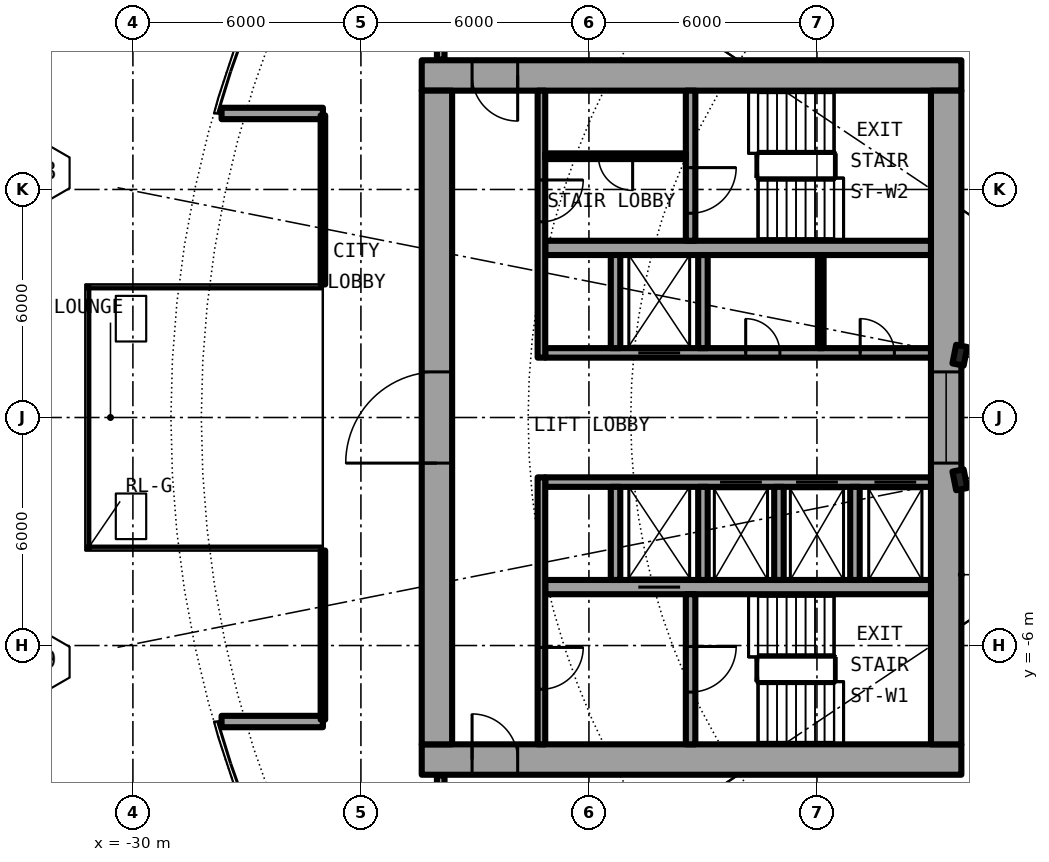
"""IFC4 building model, lengths in metres.
Left out: names, types, materials, properties, quantities, classifications, styles, units other than length and angle.
Written with IfcOpenShell. Run it as: python <this file> out.ifc"""

import sys

from ifc_helpers import new_model, si_unit, direction, frame, frame_2d, origin, origin_2d, place, context, subcontext, project, spatial, rectangle, i_section, extrude, element, fill, save


model = new_model("IFC4")
c1 = context("Model", 3, precision=1e-05, world=origin(), true_north=direction((0.0, 1.0)))
c2 = subcontext(c1, "Body", "Model", "MODEL_VIEW")
j1 = project(units=[si_unit("LENGTHUNIT", "METRE"), si_unit("PLANEANGLEUNIT", "RADIAN")], contexts=[c1])
p1 = place(None, origin())
s1 = spatial("IfcSite", under=j1, at=p1, CompositionType="ELEMENT")
p2 = place(p1, origin())
s2 = spatial("IfcBuilding", under=s1, at=p2, CompositionType="ELEMENT")
p3 = place(p2, frame((0.0, 0.0, 57.5)))
s3 = spatial("IfcBuildingStorey", under=s2, at=p3, CompositionType="ELEMENT", Elevation=57.5)
for number, where, z_axis, x_axis in (
    (1, (-8.239, 1.639, 0.0), (0.0, 0.0, 1.0), (-0.981, 0.195, 0.0)),
    (2, (-8.239, -1.639, 0.0), (0.0, 0.0, 1.0), (-0.981, -0.195, 0.0)),
):
    element("IfcColumn", number, at=place(p3, frame(where, z_axis=z_axis, x_axis=x_axis)), inside=s3, PredefinedType="COLUMN", context=c2, shape_type="SweptSolid", body=[
        extrude(i_section(OverallWidth=0.3, OverallDepth=0.5, WebThickness=0.014, FlangeThickness=0.028, FilletRadius=0.027, at=origin_2d()), origin(), (0.0, 0.0, 1.0), 6.1),
    ])
for number, where, z_axis, x_axis in (
    (3, (-25.0, 8.0, 0.0), (0.0, 0.0, 1.0), (-1.0, 0.0, 0.0)),
    (4, (-25.0, -8.0, 0.0), (0.0, 0.0, 1.0), (-1.0, 0.0, 0.0)),
):
    element("IfcWall", number, at=place(p3, frame(where, z_axis=z_axis, x_axis=x_axis)), inside=s3, PredefinedType="SOLIDWALL", context=c2, shape_type="SweptSolid", body=[
        extrude(rectangle(XDim=2.667, YDim=0.3, at=frame_2d((1.333, 0.0))), origin(), (0.0, 0.0, 1.0), 5.75),
    ])
p4 = place(p3, frame((-22.4, -9.0, 0.0), z_axis=(0.0, 0.0, 1.0), x_axis=(1.0, 0.0, 0.0)))
e5 = element("IfcWall", 5, at=p4, inside=s3, PredefinedType="SHEAR", context=c2, shape_type="SweptSolid", body=[
    extrude(rectangle(XDim=14.2, YDim=0.8, at=frame_2d((7.1, 0.0))), origin(), (0.0, 0.0, 1.0), 6.1),
])
p5 = place(p4, frame((1.325, 0.0, 0.0)))
e6 = element("IfcOpeningElement", 6, at=p5, cuts=e5, PredefinedType="OPENING", context=c2, shape_type="SweptSolid", body=[
    extrude(rectangle(XDim=1.2, YDim=2.3, at=frame_2d((0.6, 1.15))), frame((0.0, 0.41, 0.0), z_axis=(0.0, -1.0, 0.0), x_axis=(1.0, 0.0, 0.0)), (0.0, 0.0, 1.0), 0.82),
])
p6 = place(p3, frame((-8.2, 9.0, 0.0), z_axis=(0.0, 0.0, 1.0), x_axis=(-1.0, 0.0, 0.0)))
e7 = element("IfcWall", 7, at=p6, inside=s3, PredefinedType="SHEAR", context=c2, shape_type="SweptSolid", body=[
    extrude(rectangle(XDim=14.2, YDim=0.8, at=frame_2d((7.1, 0.0))), origin(), (0.0, 0.0, 1.0), 6.1),
])
p7 = place(p6, frame((11.675, 0.0, 0.0)))
e8 = element("IfcOpeningElement", 8, at=p7, cuts=e7, PredefinedType="OPENING", context=c2, shape_type="SweptSolid", body=[
    extrude(rectangle(XDim=1.2, YDim=2.3, at=frame_2d((0.6, 1.15))), frame((0.0, 0.41, 0.0), z_axis=(0.0, -1.0, 0.0), x_axis=(1.0, 0.0, 0.0)), (0.0, 0.0, 1.0), 0.82),
])
p8 = place(p3, frame((-22.0, -8.6, 0.0), z_axis=(0.0, 0.0, 1.0), x_axis=(0.0, 1.0, 0.0)))
e9 = element("IfcWall", 9, at=p8, inside=s3, PredefinedType="SHEAR", context=c2, shape_type="SweptSolid", body=[
    extrude(rectangle(XDim=17.2, YDim=0.8, at=frame_2d((8.6, 0.0))), origin(), (0.0, 0.0, 1.0), 6.1),
])
p9 = place(p8, frame((7.4, 0.0, 0.0)))
e10 = element("IfcOpeningElement", 10, at=p9, cuts=e9, PredefinedType="OPENING", context=c2, shape_type="SweptSolid", body=[
    extrude(rectangle(XDim=2.4, YDim=2.3, at=frame_2d((1.2, 1.15))), frame((0.0, 0.41, 0.0), z_axis=(0.0, -1.0, 0.0), x_axis=(1.0, 0.0, 0.0)), (0.0, 0.0, 1.0), 0.82),
])
p10 = place(p3, frame((-8.6, 8.6, 0.0), z_axis=(0.0, 0.0, 1.0), x_axis=(0.0, -1.0, 0.0)))
e11 = element("IfcWall", 11, at=p10, inside=s3, PredefinedType="SHEAR", context=c2, shape_type="SweptSolid", body=[
    extrude(rectangle(XDim=17.2, YDim=0.8, at=frame_2d((8.6, 0.0))), origin(), (0.0, 0.0, 1.0), 6.1),
])
p11 = place(p10, frame((7.4, 0.0, 0.1)))
e12 = element("IfcOpeningElement", 12, at=p11, cuts=e11, PredefinedType="OPENING", context=c2, shape_type="SweptSolid", body=[
    extrude(rectangle(XDim=2.4, YDim=2.2, at=frame_2d((1.2, 1.1))), frame((0.0, 0.41, 0.0), z_axis=(0.0, -1.0, 0.0), x_axis=(1.0, 0.0, 0.0)), (0.0, 0.0, 1.0), 0.82),
])
p12 = place(p3, frame((-9.0, -1.7, 0.0), z_axis=(0.0, 0.0, 1.0), x_axis=(-1.0, 0.0, 0.0)))
e13 = element("IfcWall", 13, at=p12, inside=s3, PredefinedType="SHEAR", context=c2, shape_type="SweptSolid", body=[
    extrude(rectangle(XDim=10.15, YDim=0.25, at=frame_2d((5.075, 0.0))), origin(), (0.0, 0.0, 1.0), 6.1),
])
p13 = place(p12, frame((0.387, 0.0, 0.0)))
e14 = element("IfcOpeningElement", 14, at=p13, cuts=e13, PredefinedType="OPENING", context=c2, shape_type="SweptSolid", body=[
    extrude(rectangle(XDim=1.1, YDim=2.3, at=frame_2d((0.55, 1.15))), frame((0.0, 0.135, 0.0), z_axis=(0.0, -1.0, 0.0), x_axis=(1.0, 0.0, 0.0)), (0.0, 0.0, 1.0), 0.27),
])
p14 = place(p12, frame((2.45, 0.0, 0.0)))
e15 = element("IfcOpeningElement", 15, at=p14, cuts=e13, PredefinedType="OPENING", context=c2, shape_type="SweptSolid", body=[
    extrude(rectangle(XDim=1.1, YDim=2.3, at=frame_2d((0.55, 1.15))), frame((0.0, 0.135, 0.0), z_axis=(0.0, -1.0, 0.0), x_axis=(1.0, 0.0, 0.0)), (0.0, 0.0, 1.0), 0.27),
])
p15 = place(p12, frame((4.45, 0.0, 0.0)))
e16 = element("IfcOpeningElement", 16, at=p15, cuts=e13, PredefinedType="OPENING", context=c2, shape_type="SweptSolid", body=[
    extrude(rectangle(XDim=1.1, YDim=2.3, at=frame_2d((0.55, 1.15))), frame((0.0, 0.135, 0.0), z_axis=(0.0, -1.0, 0.0), x_axis=(1.0, 0.0, 0.0)), (0.0, 0.0, 1.0), 0.27),
])
p16 = place(p3, frame((-9.0, -4.462, 0.0), z_axis=(0.0, 0.0, 1.0), x_axis=(-1.0, 0.0, 0.0)))
e17 = element("IfcWall", 17, at=p16, inside=s3, PredefinedType="SHEAR", context=c2, shape_type="SweptSolid", body=[
    extrude(rectangle(XDim=10.15, YDim=0.375, at=frame_2d((5.075, 0.0))), origin(), (0.0, 0.0, 1.0), 6.1),
])
p17 = place(p16, frame((6.6, 0.0, 0.0)))
e18 = element("IfcOpeningElement", 18, at=p17, cuts=e17, PredefinedType="OPENING", context=c2, shape_type="SweptSolid", body=[
    extrude(rectangle(XDim=1.1, YDim=2.3, at=frame_2d((0.55, 1.15))), frame((0.0, 0.198, 0.0), z_axis=(0.0, -1.0, 0.0), x_axis=(1.0, 0.0, 0.0)), (0.0, 0.0, 1.0), 0.395),
])
p18 = place(p3, frame((-15.325, -4.65, 0.0), z_axis=(0.0, 0.0, 1.0), x_axis=(0.0, -1.0, 0.0)))
e19 = element("IfcWall", 19, at=p18, inside=s3, PredefinedType="SHEAR", context=c2, shape_type="SweptSolid", body=[
    extrude(rectangle(XDim=3.95, YDim=0.25, at=frame_2d((1.975, 0.0))), origin(), (0.0, 0.0, 1.0), 6.1),
])
p19 = place(p18, frame((1.375, 0.0, 0.0)))
e20 = element("IfcOpeningElement", 20, at=p19, cuts=e19, PredefinedType="OPENING", context=c2, shape_type="SweptSolid", body=[
    extrude(rectangle(XDim=1.2, YDim=2.3, at=frame_2d((0.6, 1.15))), frame((0.0, 0.135, 0.0), z_axis=(0.0, -1.0, 0.0), x_axis=(1.0, 0.0, 0.0)), (0.0, 0.0, 1.0), 0.27),
])
for number, where, z_axis, x_axis in (
    (21, (-15.0, -1.825, 0.0), (0.0, 0.0, 1.0), (0.0, -1.0, 0.0)),
    (22, (-17.3, -1.825, 0.0), (0.0, 0.0, 1.0), (0.0, -1.0, 0.0)),
):
    element("IfcWall", number, at=place(p3, frame(where, z_axis=z_axis, x_axis=x_axis)), inside=s3, PredefinedType="SOLIDWALL", context=c2, shape_type="SweptSolid", body=[
        extrude(rectangle(XDim=2.45, YDim=0.25, at=frame_2d((1.225, 0.0))), origin(), (0.0, 0.0, 1.0), 5.75),
    ])
p20 = place(p3, frame((-19.25, -1.575, 0.0), z_axis=(0.0, 0.0, 1.0), x_axis=(0.0, -1.0, 0.0)))
e23 = element("IfcWall", 23, at=p20, inside=s3, PredefinedType="SOLIDWALL", context=c2, shape_type="SweptSolid", body=[
    extrude(rectangle(XDim=7.025, YDim=0.2, at=frame_2d((3.513, 0.0))), origin(), (0.0, 0.0, 1.0), 5.75),
])
p21 = place(p20, frame((4.475, 0.0, 0.0)))
e24 = element("IfcOpeningElement", 24, at=p21, cuts=e23, PredefinedType="OPENING", context=c2, shape_type="SweptSolid", body=[
    extrude(rectangle(XDim=1.1, YDim=2.3, at=frame_2d((0.55, 1.15))), frame((0.0, 0.11, 0.0), z_axis=(0.0, -1.0, 0.0), x_axis=(1.0, 0.0, 0.0)), (0.0, 0.0, 1.0), 0.22),
])
p22 = place(p3, frame((-19.15, 1.7, 0.0), z_axis=(0.0, 0.0, 1.0), x_axis=(1.0, 0.0, 0.0)))
e25 = element("IfcWall", 25, at=p22, inside=s3, PredefinedType="SHEAR", context=c2, shape_type="SweptSolid", body=[
    extrude(rectangle(XDim=10.15, YDim=0.25, at=frame_2d((5.075, 0.0))), origin(), (0.0, 0.0, 1.0), 6.1),
])
p23 = place(p22, frame((2.45, 0.0, 0.0)))
e26 = element("IfcOpeningElement", 26, at=p23, cuts=e25, PredefinedType="OPENING", context=c2, shape_type="SweptSolid", body=[
    extrude(rectangle(XDim=1.1, YDim=2.3, at=frame_2d((0.55, 1.15))), frame((0.0, 0.135, 0.0), z_axis=(0.0, -1.0, 0.0), x_axis=(1.0, 0.0, 0.0)), (0.0, 0.0, 1.0), 0.27),
])
p24 = place(p22, frame((8.288, 0.0, 0.0)))
e27 = element("IfcOpeningElement", 27, at=p24, cuts=e25, PredefinedType="OPENING", context=c2, shape_type="SweptSolid", body=[
    extrude(rectangle(XDim=0.9, YDim=2.3, at=frame_2d((0.45, 1.15))), frame((0.0, 0.135, 0.0), z_axis=(0.0, -1.0, 0.0), x_axis=(1.0, 0.0, 0.0)), (0.0, 0.0, 1.0), 0.27),
])
p25 = place(p22, frame((5.275, 0.0, 0.0)))
e28 = element("IfcOpeningElement", 28, at=p25, cuts=e25, PredefinedType="OPENING", context=c2, shape_type="SweptSolid", body=[
    extrude(rectangle(XDim=0.9, YDim=2.3, at=frame_2d((0.45, 1.15))), frame((0.0, 0.135, 0.0), z_axis=(0.0, -1.0, 0.0), x_axis=(1.0, 0.0, 0.0)), (0.0, 0.0, 1.0), 0.27),
])
p26 = place(p3, frame((-9.0, 4.462, 0.0), z_axis=(0.0, 0.0, 1.0), x_axis=(-1.0, 0.0, 0.0)))
e29 = element("IfcWall", 29, at=p26, inside=s3, PredefinedType="SHEAR", context=c2, shape_type="SweptSolid", body=[
    extrude(rectangle(XDim=10.15, YDim=0.375, at=frame_2d((5.075, 0.0))), origin(), (0.0, 0.0, 1.0), 6.1),
])
p27 = place(p3, frame((-15.325, 8.6, 0.0), z_axis=(0.0, 0.0, 1.0), x_axis=(0.0, -1.0, 0.0)))
e30 = element("IfcWall", 30, at=p27, inside=s3, PredefinedType="SHEAR", context=c2, shape_type="SweptSolid", body=[
    extrude(rectangle(XDim=3.95, YDim=0.25, at=frame_2d((1.975, 0.0))), origin(), (0.0, 0.0, 1.0), 6.1),
])
p28 = place(p27, frame((2.025, 0.0, 0.0)))
e31 = element("IfcOpeningElement", 31, at=p28, cuts=e30, PredefinedType="OPENING", context=c2, shape_type="SweptSolid", body=[
    extrude(rectangle(XDim=1.2, YDim=2.3, at=frame_2d((0.6, 1.15))), frame((0.0, 0.135, 0.0), z_axis=(0.0, -1.0, 0.0), x_axis=(1.0, 0.0, 0.0)), (0.0, 0.0, 1.0), 0.27),
])
for number, where, z_axis, x_axis in (
    (32, (-15.0, 1.825, 0.0), (0.0, 0.0, 1.0), (0.0, 1.0, 0.0)),
    (33, (-17.3, 1.825, 0.0), (0.0, 0.0, 1.0), (0.0, 1.0, 0.0)),
):
    element("IfcWall", number, at=place(p3, frame(where, z_axis=z_axis, x_axis=x_axis)), inside=s3, PredefinedType="SOLIDWALL", context=c2, shape_type="SweptSolid", body=[
        extrude(rectangle(XDim=2.45, YDim=0.25, at=frame_2d((1.225, 0.0))), origin(), (0.0, 0.0, 1.0), 5.75),
    ])
p29 = place(p3, frame((-19.25, 8.6, 0.0), z_axis=(0.0, 0.0, 1.0), x_axis=(0.0, -1.0, 0.0)))
e34 = element("IfcWall", 34, at=p29, inside=s3, PredefinedType="SOLIDWALL", context=c2, shape_type="SweptSolid", body=[
    extrude(rectangle(XDim=7.025, YDim=0.2, at=frame_2d((3.513, 0.0))), origin(), (0.0, 0.0, 1.0), 5.75),
])
p30 = place(p29, frame((2.35, 0.0, 0.0)))
e35 = element("IfcOpeningElement", 35, at=p30, cuts=e34, PredefinedType="OPENING", context=c2, shape_type="SweptSolid", body=[
    extrude(rectangle(XDim=1.1, YDim=2.3, at=frame_2d((0.55, 1.15))), frame((0.0, 0.11, 0.0), z_axis=(0.0, -1.0, 0.0), x_axis=(1.0, 0.0, 0.0)), (0.0, 0.0, 1.0), 0.22),
])
for number, where, z_axis, x_axis in (
    (36, (-11.0, -1.825, 0.0), (0.0, 0.0, 1.0), (0.0, -1.0, 0.0)),
    (37, (-13.0, -1.825, 0.0), (0.0, 0.0, 1.0), (0.0, -1.0, 0.0)),
):
    element("IfcWall", number, at=place(p3, frame(where, z_axis=z_axis, x_axis=x_axis)), inside=s3, PredefinedType="SOLIDWALL", context=c2, shape_type="SweptSolid", body=[
        extrude(rectangle(XDim=2.45, YDim=0.25, at=frame_2d((1.225, 0.0))), origin(), (0.0, 0.0, 1.0), 5.75),
    ])
p31 = place(p3, frame((-11.9, 1.825, 0.0), z_axis=(0.0, 0.0, 1.0), x_axis=(0.0, 1.0, 0.0)))
e38 = element("IfcWall", 38, at=p31, inside=s3, PredefinedType="PARTITIONING", context=c2, shape_type="SweptSolid", body=[
    extrude(rectangle(XDim=2.45, YDim=0.15, at=frame_2d((1.225, 0.0))), origin(), (0.0, 0.0, 1.0), 5.75),
])
p32 = place(p3, frame((-15.45, 6.875, 0.0), z_axis=(0.0, 0.0, 1.0), x_axis=(-1.0, 0.0, 0.0)))
e39 = element("IfcWall", 39, at=p32, inside=s3, PredefinedType="PARTITIONING", context=c2, shape_type="SweptSolid", body=[
    extrude(rectangle(XDim=3.7, YDim=0.15, at=frame_2d((1.85, 0.0))), origin(), (0.0, 0.0, 1.0), 5.75),
])
p33 = place(p32, frame((1.4, 0.0, 0.0)))
e40 = element("IfcOpeningElement", 40, at=p33, cuts=e39, PredefinedType="OPENING", context=c2, shape_type="SweptSolid", body=[
    extrude(rectangle(XDim=0.9, YDim=2.3, at=frame_2d((0.45, 1.15))), frame((0.0, 0.085, 0.0), z_axis=(0.0, -1.0, 0.0), x_axis=(1.0, 0.0, 0.0)), (0.0, 0.0, 1.0), 0.17),
])
p34 = place(p3, frame((-25.0, 3.5, 0.0), z_axis=(0.0, 0.0, 1.0), x_axis=(0.0, 1.0, 0.0)))
e41 = element("IfcWall", 41, at=p34, inside=s3, PredefinedType="PARTITIONING", context=c2, shape_type="SweptSolid", body=[
    extrude(rectangle(XDim=4.45, YDim=0.12, at=frame_2d((2.225, 0.0))), origin(), (0.0, 0.0, 1.0), 5.75),
])
p35 = place(p34, frame((0.4, 0.0, 0.1)))
e42 = element("IfcOpeningElement", 42, at=p35, cuts=e41, PredefinedType="OPENING", context=c2, shape_type="SweptSolid", body=[
    extrude(rectangle(XDim=3.6, YDim=5.4, at=frame_2d((1.8, 2.7))), frame((0.0, 0.07, 0.0), z_axis=(0.0, -1.0, 0.0), x_axis=(1.0, 0.0, 0.0)), (0.0, 0.0, 1.0), 0.14),
])
p36 = place(p3, frame((-25.0, -3.5, 0.0), z_axis=(0.0, 0.0, 1.0), x_axis=(0.0, -1.0, 0.0)))
e43 = element("IfcWall", 43, at=p36, inside=s3, PredefinedType="PARTITIONING", context=c2, shape_type="SweptSolid", body=[
    extrude(rectangle(XDim=4.45, YDim=0.12, at=frame_2d((2.225, 0.0))), origin(), (0.0, 0.0, 1.0), 5.75),
])
p37 = place(p36, frame((0.4, 0.0, 0.1)))
e44 = element("IfcOpeningElement", 44, at=p37, cuts=e43, PredefinedType="OPENING", context=c2, shape_type="SweptSolid", body=[
    extrude(rectangle(XDim=3.6, YDim=5.4, at=frame_2d((1.8, 2.7))), frame((0.0, 0.07, 0.0), z_axis=(0.0, -1.0, 0.0), x_axis=(1.0, 0.0, 0.0)), (0.0, 0.0, 1.0), 0.14),
])
p38 = place(p3, frame((-10.393, 25.091, 0.0), z_axis=(0.0, 0.0, 1.0), x_axis=(0.382668905709, -0.923885549516, 0.0)))
e45 = element("IfcWall", 45, at=p38, inside=s3, PredefinedType="PARTITIONING", context=c2, shape_type="SweptSolid", body=[
    extrude(rectangle(XDim=17.339, YDim=0.15, at=frame_2d((8.669, 0.0))), origin(), (0.0, 0.0, 1.0), 5.75),
])
for number, where, z_axis, x_axis in (
    (46, (-21.9, -12.82, 0.0), (0.0, 0.0, 1.0), (0.0, 1.0, 0.0)),
    (47, (-21.9, 9.42, 0.0), (0.0, 0.0, 1.0), (0.0, 1.0, 0.0)),
):
    element("IfcWall", number, at=place(p3, frame(where, z_axis=z_axis, x_axis=x_axis)), inside=s3, PredefinedType="PARTITIONING", context=c2, shape_type="SweptSolid", body=[
        extrude(rectangle(XDim=3.4, YDim=0.2, at=frame_2d((1.7, 0.0))), origin(), (0.0, 0.0, 1.0), 5.75),
    ])
p39 = place(p13, origin())
e48 = element("IfcDoor", 48, at=p39, inside=s3, OperationType="DOUBLE_DOOR_SLIDING", PredefinedType="DOOR", context=c2, shape_type="SweptSolid", body=[
    extrude(rectangle(XDim=1.1, YDim=2.3, at=frame_2d((0.55, 1.15))), frame((0.0, 0.025, 0.0), z_axis=(0.0, -1.0, 0.0), x_axis=(1.0, 0.0, 0.0)), (0.0, 0.0, 1.0), 0.05),
])
fill(e14, e48)
p40 = place(p14, origin())
e49 = element("IfcDoor", 49, at=p40, inside=s3, OperationType="DOUBLE_DOOR_SLIDING", PredefinedType="DOOR", context=c2, shape_type="SweptSolid", body=[
    extrude(rectangle(XDim=1.1, YDim=2.3, at=frame_2d((0.55, 1.15))), frame((0.0, 0.025, 0.0), z_axis=(0.0, -1.0, 0.0), x_axis=(1.0, 0.0, 0.0)), (0.0, 0.0, 1.0), 0.05),
])
fill(e15, e49)
p41 = place(p15, origin())
e50 = element("IfcDoor", 50, at=p41, inside=s3, OperationType="DOUBLE_DOOR_SLIDING", PredefinedType="DOOR", context=c2, shape_type="SweptSolid", body=[
    extrude(rectangle(XDim=1.1, YDim=2.3, at=frame_2d((0.55, 1.15))), frame((0.0, 0.025, 0.0), z_axis=(0.0, -1.0, 0.0), x_axis=(1.0, 0.0, 0.0)), (0.0, 0.0, 1.0), 0.05),
])
fill(e16, e50)
p42 = place(p17, origin())
e51 = element("IfcDoor", 51, at=p42, inside=s3, OperationType="DOUBLE_DOOR_SLIDING", PredefinedType="DOOR", context=c2, shape_type="SweptSolid", body=[
    extrude(rectangle(XDim=1.1, YDim=2.3, at=frame_2d((0.55, 1.15))), frame((0.0, 0.025, 0.0), z_axis=(0.0, -1.0, 0.0), x_axis=(1.0, 0.0, 0.0)), (0.0, 0.0, 1.0), 0.05),
])
fill(e18, e51)
p43 = place(p23, origin())
e52 = element("IfcDoor", 52, at=p43, inside=s3, OperationType="DOUBLE_DOOR_SLIDING", PredefinedType="DOOR", context=c2, shape_type="SweptSolid", body=[
    extrude(rectangle(XDim=1.1, YDim=2.3, at=frame_2d((0.55, 1.15))), frame((0.0, 0.025, 0.0), z_axis=(0.0, -1.0, 0.0), x_axis=(1.0, 0.0, 0.0)), (0.0, 0.0, 1.0), 0.05),
])
fill(e26, e52)
p44 = place(p24, origin())
e53 = element("IfcDoor", 53, at=p44, inside=s3, OperationType="SINGLE_SWING_LEFT", PredefinedType="DOOR", context=c2, shape_type="SweptSolid", body=[
    extrude(rectangle(XDim=0.9, YDim=2.3, at=frame_2d((0.45, 1.15))), frame((0.0, 0.025, 0.0), z_axis=(0.0, -1.0, 0.0), x_axis=(1.0, 0.0, 0.0)), (0.0, 0.0, 1.0), 0.05),
])
fill(e27, e53)
p45 = place(p25, origin())
e54 = element("IfcDoor", 54, at=p45, inside=s3, OperationType="SINGLE_SWING_LEFT", PredefinedType="DOOR", context=c2, shape_type="SweptSolid", body=[
    extrude(rectangle(XDim=0.9, YDim=2.3, at=frame_2d((0.45, 1.15))), frame((0.0, 0.025, 0.0), z_axis=(0.0, -1.0, 0.0), x_axis=(1.0, 0.0, 0.0)), (0.0, 0.0, 1.0), 0.05),
])
fill(e28, e54)
p46 = place(p33, origin())
e55 = element("IfcDoor", 55, at=p46, inside=s3, OperationType="SINGLE_SWING_LEFT", PredefinedType="DOOR", context=c2, shape_type="SweptSolid", body=[
    extrude(rectangle(XDim=0.9, YDim=2.3, at=frame_2d((0.45, 1.15))), frame((0.0, 0.025, 0.0), z_axis=(0.0, -1.0, 0.0), x_axis=(1.0, 0.0, 0.0)), (0.0, 0.0, 1.0), 0.05),
])
fill(e40, e55)
p47 = place(p19, origin())
e56 = element("IfcDoor", 56, at=p47, inside=s3, OperationType="SINGLE_SWING_LEFT", PredefinedType="DOOR", context=c2, shape_type="SweptSolid", body=[
    extrude(rectangle(XDim=1.2, YDim=2.3, at=frame_2d((0.6, 1.15))), frame((0.0, 0.025, 0.0), z_axis=(0.0, -1.0, 0.0), x_axis=(1.0, 0.0, 0.0)), (0.0, 0.0, 1.0), 0.05),
])
fill(e20, e56)
p48 = place(p28, origin())
e57 = element("IfcDoor", 57, at=p48, inside=s3, OperationType="SINGLE_SWING_LEFT", PredefinedType="DOOR", context=c2, shape_type="SweptSolid", body=[
    extrude(rectangle(XDim=1.2, YDim=2.3, at=frame_2d((0.6, 1.15))), frame((0.0, 0.025, 0.0), z_axis=(0.0, -1.0, 0.0), x_axis=(1.0, 0.0, 0.0)), (0.0, 0.0, 1.0), 0.05),
])
fill(e31, e57)
p49 = place(p21, origin())
e58 = element("IfcDoor", 58, at=p49, inside=s3, OperationType="SINGLE_SWING_LEFT", PredefinedType="DOOR", context=c2, shape_type="SweptSolid", body=[
    extrude(rectangle(XDim=1.1, YDim=2.3, at=frame_2d((0.55, 1.15))), frame((0.0, 0.025, 0.0), z_axis=(0.0, -1.0, 0.0), x_axis=(1.0, 0.0, 0.0)), (0.0, 0.0, 1.0), 0.05),
])
fill(e24, e58)
p50 = place(p30, origin())
e59 = element("IfcDoor", 59, at=p50, inside=s3, OperationType="SINGLE_SWING_RIGHT", PredefinedType="DOOR", context=c2, shape_type="SweptSolid", body=[
    extrude(rectangle(XDim=1.1, YDim=2.3, at=frame_2d((0.55, 1.15))), frame((0.0, 0.025, 0.0), z_axis=(0.0, -1.0, 0.0), x_axis=(1.0, 0.0, 0.0)), (0.0, 0.0, 1.0), 0.05),
])
fill(e35, e59)
p51 = place(p5, origin())
e60 = element("IfcDoor", 60, at=p51, inside=s3, OperationType="SINGLE_SWING_RIGHT", PredefinedType="DOOR", context=c2, shape_type="SweptSolid", body=[
    extrude(rectangle(XDim=1.2, YDim=2.3, at=frame_2d((0.6, 1.15))), frame((0.0, 0.025, 0.0), z_axis=(0.0, -1.0, 0.0), x_axis=(1.0, 0.0, 0.0)), (0.0, 0.0, 1.0), 0.05),
])
fill(e6, e60)
p52 = place(p7, origin())
e61 = element("IfcDoor", 61, at=p52, inside=s3, OperationType="SINGLE_SWING_LEFT", PredefinedType="DOOR", context=c2, shape_type="SweptSolid", body=[
    extrude(rectangle(XDim=1.2, YDim=2.3, at=frame_2d((0.6, 1.15))), frame((0.0, 0.025, 0.0), z_axis=(0.0, -1.0, 0.0), x_axis=(1.0, 0.0, 0.0)), (0.0, 0.0, 1.0), 0.05),
])
fill(e8, e61)
p53 = place(p9, origin())
e62 = element("IfcDoor", 62, at=p53, inside=s3, OperationType="SINGLE_SWING_LEFT", PredefinedType="DOOR", context=c2, shape_type="SweptSolid", body=[
    extrude(rectangle(XDim=2.4, YDim=2.3, at=frame_2d((1.2, 1.15))), frame((0.0, 0.025, 0.0), z_axis=(0.0, -1.0, 0.0), x_axis=(1.0, 0.0, 0.0)), (0.0, 0.0, 1.0), 0.05),
])
fill(e10, e62)
p54 = place(p11, origin())
e63 = element("IfcWindow", 63, at=p54, inside=s3, PartitioningType="SINGLE_PANEL", PredefinedType="WINDOW", context=c2, shape_type="SweptSolid", body=[
    extrude(rectangle(XDim=2.4, YDim=2.2, at=frame_2d((1.2, 1.1))), frame((0.0, 0.03, 0.0), z_axis=(0.0, -1.0, 0.0), x_axis=(1.0, 0.0, 0.0)), (0.0, 0.0, 1.0), 0.06),
])
fill(e12, e63)
p55 = place(p35, origin())
e64 = element("IfcWindow", 64, at=p55, inside=s3, PartitioningType="SINGLE_PANEL", PredefinedType="WINDOW", context=c2, shape_type="SweptSolid", body=[
    extrude(rectangle(XDim=3.6, YDim=5.4, at=frame_2d((1.8, 2.7))), frame((0.0, 0.03, 0.0), z_axis=(0.0, -1.0, 0.0), x_axis=(1.0, 0.0, 0.0)), (0.0, 0.0, 1.0), 0.06),
])
fill(e42, e64)
p56 = place(p37, origin())
e65 = element("IfcWindow", 65, at=p56, inside=s3, PartitioningType="SINGLE_PANEL", PredefinedType="WINDOW", context=c2, shape_type="SweptSolid", body=[
    extrude(rectangle(XDim=3.6, YDim=5.4, at=frame_2d((1.8, 2.7))), frame((0.0, 0.03, 0.0), z_axis=(0.0, -1.0, 0.0), x_axis=(1.0, 0.0, 0.0)), (0.0, 0.0, 1.0), 0.06),
])
fill(e44, e65)
save(model, sys.argv[1])
